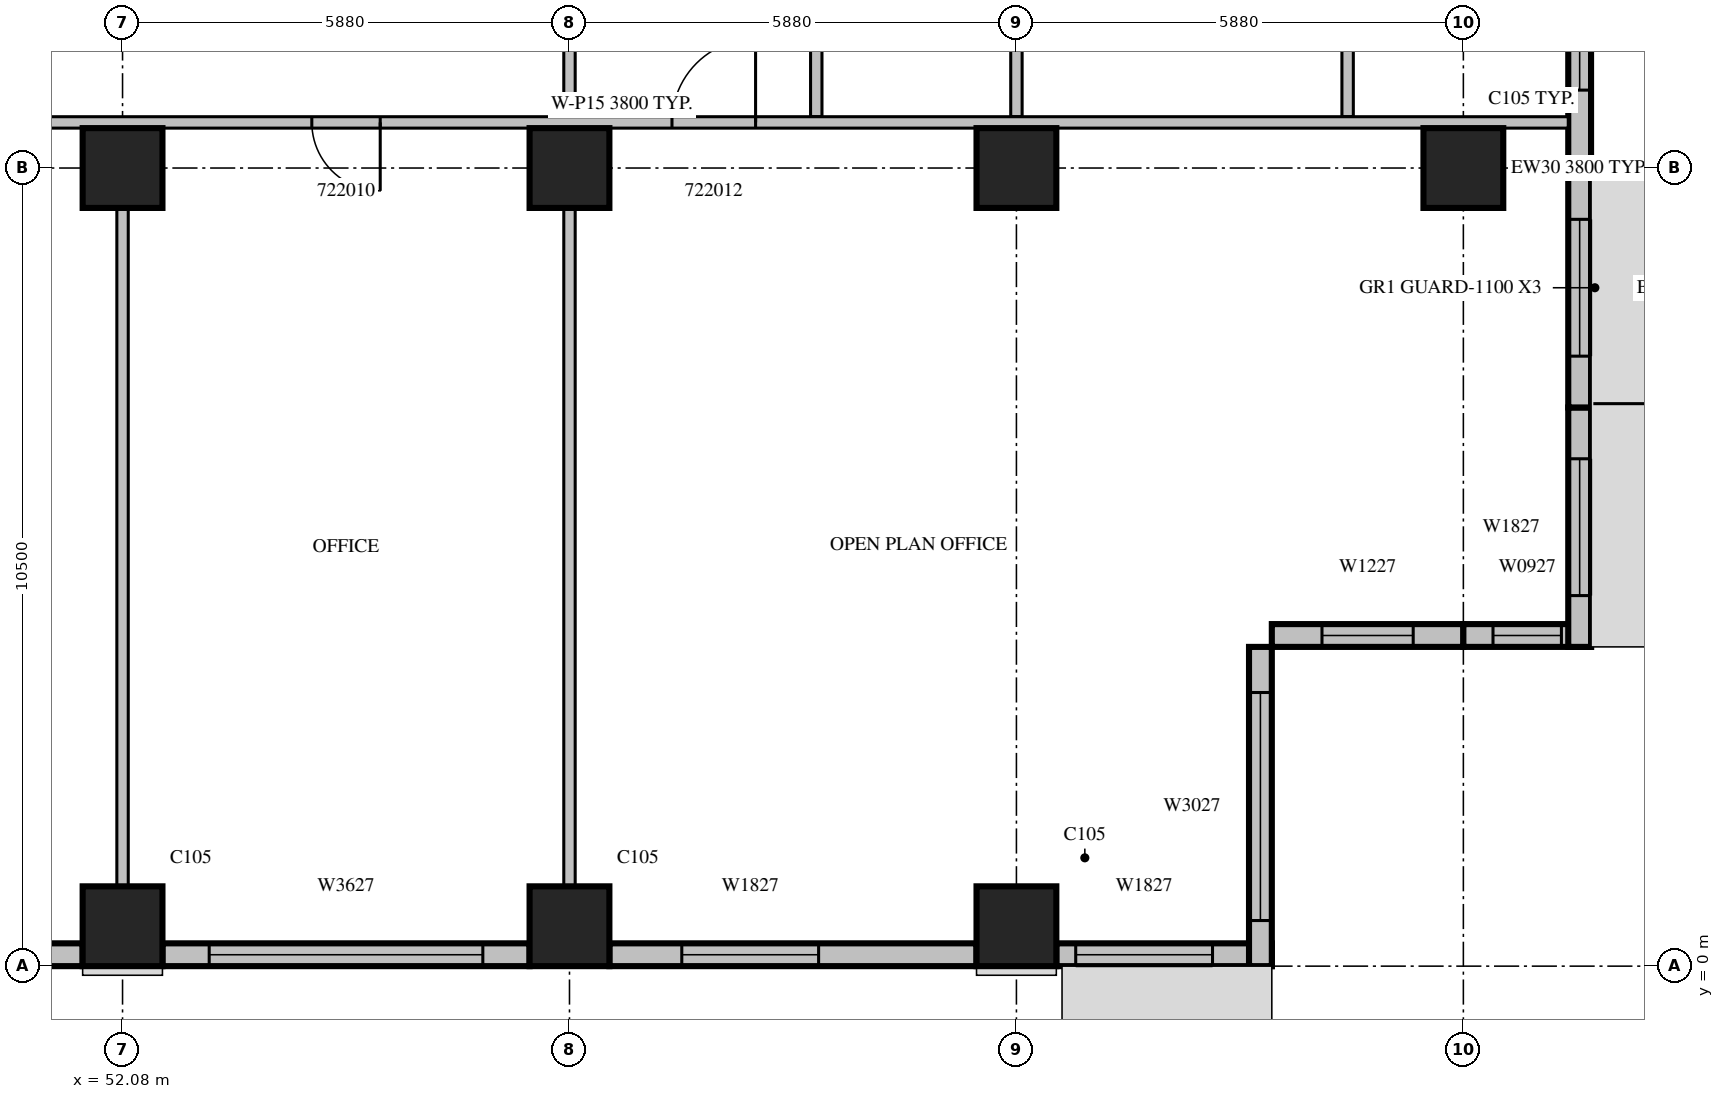
"""IFC4 building model, lengths in metres.
Left out: names, types, materials, properties, quantities, classifications, styles, units other than length and angle.
Written with IfcOpenShell. Run it as: python <this file> out.ifc"""

import sys

from ifc_helpers import new_model, si_unit, direction, frame, frame_2d, origin, origin_2d, place, context, subcontext, project, spatial, rectangle, extrude, source, transform, mapped, element, fill, save


model = new_model("IFC4")
c1 = context("Model", 3, precision=1e-05, world=origin(), true_north=direction((0.0, 1.0)))
c2 = subcontext(c1, "Body", "Model", "MODEL_VIEW")
j1 = project(units=[si_unit("LENGTHUNIT", "METRE"), si_unit("PLANEANGLEUNIT", "RADIAN")], contexts=[c1])
p1 = place(None, origin())
s1 = spatial("IfcSite", under=j1, at=p1, CompositionType="ELEMENT")
p2 = place(p1, origin())
s2 = spatial("IfcBuilding", under=s1, at=p2, CompositionType="ELEMENT")
p3 = place(p2, frame((0.0, 0.0, 103.5)))
s3 = spatial("IfcBuildingStorey", under=s2, at=p3, CompositionType="ELEMENT", Elevation=103.5)
m1 = source(origin(), c2, "Body", "SweptSolid", [
    extrude(rectangle(XDim=1.05, YDim=1.05, at=origin_2d()), origin(), (0.0, 0.0, 1.0), 4.2),
])
for number, where, z_axis, x_axis in (
    (1, (52.08, 0.525, 0.0), (0.0, 0.0, 1.0), (1.0, 0.0, 0.0)),
    (2, (57.96, 0.525, 0.0), (0.0, 0.0, 1.0), (1.0, 0.0, 0.0)),
    (3, (63.84, 0.525, 0.0), (0.0, 0.0, 1.0), (1.0, 0.0, 0.0)),
    (4, (52.08, 10.5, 0.0), (0.0, 0.0, 1.0), (1.0, 0.0, 0.0)),
    (5, (57.96, 10.5, 0.0), (0.0, 0.0, 1.0), (1.0, 0.0, 0.0)),
    (6, (63.84, 10.5, 0.0), (0.0, 0.0, 1.0), (1.0, 0.0, 0.0)),
    (7, (69.72, 10.5, 0.0), (0.0, 0.0, 1.0), (1.0, 0.0, 0.0)),
):
    element("IfcColumn", number, at=place(p3, frame(where, z_axis=z_axis, x_axis=x_axis)), inside=s3, PredefinedType="COLUMN", context=c2, shape_type="MappedRepresentation", body=[
        mapped(m1, transform((0.0, 0.0, 0.0), scale=1.0)),
    ])
p4 = place(p3, frame((46.725, 0.15, 0.0), z_axis=(0.0, 0.0, 1.0), x_axis=(1.0, 0.0, 0.0)))
e8 = element("IfcWall", 8, at=p4, inside=s3, PredefinedType="STANDARD", context=c2, shape_type="SweptSolid", body=[
    extrude(rectangle(XDim=4.83, YDim=0.3, at=frame_2d((2.415, 0.0))), origin(), (0.0, 0.0, 1.0), 3.3),
])
m2 = source(origin(), c2, "Body", "SweptSolid", [
    extrude(rectangle(XDim=3.6, YDim=2.7, at=frame_2d((1.8, 1.35))), frame((0.0, 0.16, 0.0), z_axis=(0.0, -1.0, 0.0), x_axis=(1.0, 0.0, 0.0)), (0.0, 0.0, 1.0), 0.32),
])
p5 = place(p4, frame((0.615, 0.0, 0.6)))
e9 = element("IfcOpeningElement", 9, at=p5, cuts=e8, PredefinedType="OPENING", context=c2, shape_type="MappedRepresentation", body=[
    mapped(m2, transform((0.0, 0.0, 0.0), scale=1.0)),
])
p6 = place(p3, frame((52.605, 0.15, 0.0), z_axis=(0.0, 0.0, 1.0), x_axis=(1.0, 0.0, 0.0)))
e10 = element("IfcWall", 10, at=p6, inside=s3, PredefinedType="STANDARD", context=c2, shape_type="SweptSolid", body=[
    extrude(rectangle(XDim=4.83, YDim=0.3, at=frame_2d((2.415, 0.0))), origin(), (0.0, 0.0, 1.0), 3.8),
])
p7 = place(p6, frame((0.615, 0.0, 0.6)))
e11 = element("IfcOpeningElement", 11, at=p7, cuts=e10, PredefinedType="OPENING", context=c2, shape_type="MappedRepresentation", body=[
    mapped(m2, transform((0.0, 0.0, 0.0), scale=1.0)),
])
m3 = source(origin(), c2, "Body", "SweptSolid", [
    extrude(rectangle(XDim=4.83, YDim=0.3, at=frame_2d((2.415, 0.0))), origin(), (0.0, 0.0, 1.0), 3.8),
])
p8 = place(p3, frame((58.485, 0.15, 0.0), z_axis=(0.0, 0.0, 1.0), x_axis=(1.0, 0.0, 0.0)))
e12 = element("IfcWall", 12, at=p8, inside=s3, PredefinedType="STANDARD", context=c2, shape_type="MappedRepresentation", body=[
    mapped(m3, transform((0.0, 0.0, 0.0), scale=1.0)),
])
m4 = source(origin(), c2, "Body", "SweptSolid", [
    extrude(rectangle(XDim=1.8, YDim=2.7, at=frame_2d((0.9, 1.35))), frame((0.0, 0.16, 0.0), z_axis=(0.0, -1.0, 0.0), x_axis=(1.0, 0.0, 0.0)), (0.0, 0.0, 1.0), 0.32),
])
p9 = place(p8, frame((0.953, 0.0, 0.6)))
e13 = element("IfcOpeningElement", 13, at=p9, cuts=e12, PredefinedType="OPENING", context=c2, shape_type="MappedRepresentation", body=[
    mapped(m4, transform((0.0, 0.0, 0.0), scale=1.0)),
])
p10 = place(p3, frame((64.365, 0.15, 0.0), z_axis=(0.0, 0.0, 1.0), x_axis=(1.0, 0.0, 0.0)))
e14 = element("IfcWall", 14, at=p10, inside=s3, PredefinedType="STANDARD", context=c2, shape_type="SweptSolid", body=[
    extrude(rectangle(XDim=2.835, YDim=0.3, at=frame_2d((1.417, 0.0))), origin(), (0.0, 0.0, 1.0), 3.8),
])
p11 = place(p10, frame((0.255, 0.0, 0.6)))
e15 = element("IfcOpeningElement", 15, at=p11, cuts=e14, PredefinedType="OPENING", context=c2, shape_type="MappedRepresentation", body=[
    mapped(m4, transform((0.0, 0.0, 0.0), scale=1.0)),
])
m5 = source(origin(), c2, "Body", "SweptSolid", [
    extrude(rectangle(XDim=4.2, YDim=0.3, at=frame_2d((2.1, 0.0))), origin(), (0.0, 0.0, 1.0), 3.8),
])
p12 = place(p3, frame((67.05, 0.0, 0.0), z_axis=(0.0, 0.0, 1.0), x_axis=(0.0, 1.0, 0.0)))
e16 = element("IfcWall", 16, at=p12, inside=s3, PredefinedType="STANDARD", context=c2, shape_type="MappedRepresentation", body=[
    mapped(m5, transform((0.0, 0.0, 0.0), scale=1.0)),
])
m6 = source(origin(), c2, "Body", "SweptSolid", [
    extrude(rectangle(XDim=3.0, YDim=2.7, at=frame_2d((1.5, 1.35))), frame((0.0, 0.16, 0.0), z_axis=(0.0, -1.0, 0.0), x_axis=(1.0, 0.0, 0.0)), (0.0, 0.0, 1.0), 0.32),
])
p13 = place(p12, frame((0.6, 0.0, 0.6)))
e17 = element("IfcOpeningElement", 17, at=p13, cuts=e16, PredefinedType="OPENING", context=c2, shape_type="MappedRepresentation", body=[
    mapped(m6, transform((0.0, 0.0, 0.0), scale=1.0)),
])
m7 = source(origin(), c2, "Body", "SweptSolid", [
    extrude(rectangle(XDim=2.52, YDim=0.3, at=frame_2d((1.26, 0.0))), origin(), (0.0, 0.0, 1.0), 3.8),
])
p14 = place(p3, frame((67.2, 4.35, 0.0), z_axis=(0.0, 0.0, 1.0), x_axis=(1.0, 0.0, 0.0)))
e18 = element("IfcWall", 18, at=p14, inside=s3, PredefinedType="STANDARD", context=c2, shape_type="MappedRepresentation", body=[
    mapped(m7, transform((0.0, 0.0, 0.0), scale=1.0)),
])
m8 = source(origin(), c2, "Body", "SweptSolid", [
    extrude(rectangle(XDim=1.2, YDim=2.7, at=frame_2d((0.6, 1.35))), frame((0.0, 0.16, 0.0), z_axis=(0.0, -1.0, 0.0), x_axis=(1.0, 0.0, 0.0)), (0.0, 0.0, 1.0), 0.32),
])
p15 = place(p14, frame((0.66, 0.0, 0.6)))
e19 = element("IfcOpeningElement", 19, at=p15, cuts=e18, PredefinedType="OPENING", context=c2, shape_type="MappedRepresentation", body=[
    mapped(m8, transform((0.0, 0.0, 0.0), scale=1.0)),
])
m9 = source(origin(), c2, "Body", "SweptSolid", [
    extrude(rectangle(XDim=1.68, YDim=0.3, at=frame_2d((0.84, 0.0))), origin(), (0.0, 0.0, 1.0), 3.8),
])
p16 = place(p3, frame((69.72, 4.35, 0.0), z_axis=(0.0, 0.0, 1.0), x_axis=(1.0, 0.0, 0.0)))
e20 = element("IfcWall", 20, at=p16, inside=s3, PredefinedType="STANDARD", context=c2, shape_type="MappedRepresentation", body=[
    mapped(m9, transform((0.0, 0.0, 0.0), scale=1.0)),
])
m10 = source(origin(), c2, "Body", "SweptSolid", [
    extrude(rectangle(XDim=0.9, YDim=2.7, at=frame_2d((0.45, 1.35))), frame((0.0, 0.16, 0.0), z_axis=(0.0, -1.0, 0.0), x_axis=(1.0, 0.0, 0.0)), (0.0, 0.0, 1.0), 0.32),
])
p17 = place(p16, frame((0.39, 0.0, 0.6)))
e21 = element("IfcOpeningElement", 21, at=p17, cuts=e20, PredefinedType="OPENING", context=c2, shape_type="MappedRepresentation", body=[
    mapped(m10, transform((0.0, 0.0, 0.0), scale=1.0)),
])
m11 = source(origin(), c2, "Body", "SweptSolid", [
    extrude(rectangle(XDim=3.15, YDim=0.3, at=frame_2d((1.575, 0.0))), origin(), (0.0, 0.0, 1.0), 3.8),
])
p18 = place(p3, frame((71.25, 4.2, 0.0), z_axis=(0.0, 0.0, 1.0), x_axis=(0.0, 1.0, 0.0)))
e22 = element("IfcWall", 22, at=p18, inside=s3, PredefinedType="STANDARD", context=c2, shape_type="MappedRepresentation", body=[
    mapped(m11, transform((0.0, 0.0, 0.0), scale=1.0)),
])
p19 = place(p18, frame((0.675, 0.0, 0.6)))
e23 = element("IfcOpeningElement", 23, at=p19, cuts=e22, PredefinedType="OPENING", context=c2, shape_type="MappedRepresentation", body=[
    mapped(m4, transform((0.0, 0.0, 0.0), scale=1.0)),
])
p20 = place(p3, frame((71.25, 7.35, 0.0), z_axis=(0.0, 0.0, 1.0), x_axis=(0.0, 1.0, 0.0)))
e24 = element("IfcWall", 24, at=p20, inside=s3, PredefinedType="STANDARD", context=c2, shape_type="MappedRepresentation", body=[
    mapped(m11, transform((0.0, 0.0, 0.0), scale=1.0)),
])
m12 = source(origin(), c2, "Body", "SweptSolid", [
    extrude(rectangle(XDim=1.8, YDim=2.4, at=frame_2d((0.9, 1.2))), frame((0.0, 0.16, 0.0), z_axis=(0.0, -1.0, 0.0), x_axis=(1.0, 0.0, 0.0)), (0.0, 0.0, 1.0), 0.32),
])
p21 = place(p20, frame((0.675, 0.0, 0.0)))
e25 = element("IfcOpeningElement", 25, at=p21, cuts=e24, PredefinedType="OPENING", context=c2, shape_type="MappedRepresentation", body=[
    mapped(m12, transform((0.0, 0.0, 0.0), scale=1.0)),
])
m13 = source(origin(), c2, "Body", "SweptSolid", [
    extrude(rectangle(XDim=6.3, YDim=0.3, at=frame_2d((3.15, 0.0))), origin(), (0.0, 0.0, 1.0), 3.8),
])
p22 = place(p3, frame((71.25, 10.5, 0.0), z_axis=(0.0, 0.0, 1.0), x_axis=(0.0, 1.0, 0.0)))
e26 = element("IfcWall", 26, at=p22, inside=s3, PredefinedType="STANDARD", context=c2, shape_type="MappedRepresentation", body=[
    mapped(m13, transform((0.0, 0.0, 0.0), scale=1.0)),
])
p23 = place(p22, frame((1.025, 0.0, 0.6)))
e27 = element("IfcOpeningElement", 27, at=p23, cuts=e26, PredefinedType="OPENING", context=c2, shape_type="MappedRepresentation", body=[
    mapped(m8, transform((0.0, 0.0, 0.0), scale=1.0)),
])
p24 = place(p3, frame((52.08, 1.049, 0.0), z_axis=(0.0, 0.0, 1.0), x_axis=(0.0, 1.0, 0.0)))
e28 = element("IfcWall", 28, at=p24, inside=s3, PredefinedType="PARTITIONING", context=c2, shape_type="SweptSolid", body=[
    extrude(rectangle(XDim=8.927, YDim=0.15, at=frame_2d((4.463, 0.0))), origin(), (0.0, 0.0, 1.0), 3.8),
])
p25 = place(p3, frame((61.207, 11.175, 0.0), z_axis=(0.0, 0.0, 1.0), x_axis=(0.0, 1.0, 0.0)))
e29 = element("IfcWall", 29, at=p25, inside=s3, PredefinedType="PARTITIONING", context=c2, shape_type="SweptSolid", body=[
    extrude(rectangle(XDim=3.825, YDim=0.15, at=frame_2d((1.913, 0.0))), origin(), (0.0, 0.0, 1.0), 3.8),
])
m14 = source(origin(), c2, "Body", "SweptSolid", [
    extrude(rectangle(XDim=3.825, YDim=0.15, at=frame_2d((1.913, 0.0))), origin(), (0.0, 0.0, 1.0), 3.8),
])
for number, where, z_axis, x_axis in (
    (30, (63.84, 11.175, 0.0), (0.0, 0.0, 1.0), (0.0, 1.0, 0.0)),
    (31, (68.197, 11.175, 0.0), (0.0, 0.0, 1.0), (0.0, 1.0, 0.0)),
):
    element("IfcWall", number, at=place(p3, frame(where, z_axis=z_axis, x_axis=x_axis)), inside=s3, PredefinedType="PARTITIONING", context=c2, shape_type="MappedRepresentation", body=[
        mapped(m14, transform((0.0, 0.0, 0.0), scale=1.0)),
    ])
m15 = source(origin(), c2, "Body", "SweptSolid", [
    extrude(rectangle(XDim=8.927, YDim=0.15, at=frame_2d((4.463, 0.0))), origin(), (0.0, 0.0, 1.0), 3.8),
])
p26 = place(p3, frame((57.96, 1.049, 0.0), z_axis=(0.0, 0.0, 1.0), x_axis=(0.0, 1.0, 0.0)))
e32 = element("IfcWall", 32, at=p26, inside=s3, PredefinedType="PARTITIONING", context=c2, shape_type="MappedRepresentation", body=[
    mapped(m15, transform((0.0, 0.0, 0.0), scale=1.0)),
])
p27 = place(p3, frame((57.96, 11.175, 0.0), z_axis=(0.0, 0.0, 1.0), x_axis=(0.0, 1.0, 0.0)))
e33 = element("IfcWall", 33, at=p27, inside=s3, PredefinedType="PARTITIONING", context=c2, shape_type="MappedRepresentation", body=[
    mapped(m14, transform((0.0, 0.0, 0.0), scale=1.0)),
])
m16 = source(origin(), c2, "Body", "SweptSolid", [
    extrude(rectangle(XDim=24.9, YDim=0.15, at=frame_2d((12.45, 0.0))), origin(), (0.0, 0.0, 1.0), 3.8),
])
p28 = place(p3, frame((71.1, 11.1, 0.0), z_axis=(0.0, 0.0, 1.0), x_axis=(-1.0, 0.0, 0.0)))
e34 = element("IfcWall", 34, at=p28, inside=s3, PredefinedType="PARTITIONING", context=c2, shape_type="MappedRepresentation", body=[
    mapped(m16, transform((0.0, 0.0, 0.0), scale=1.0)),
])
m17 = source(origin(), c2, "Body", "SweptSolid", [
    extrude(rectangle(XDim=0.9, YDim=2.1, at=frame_2d((0.45, 1.05))), frame((0.0, 0.085, 0.0), z_axis=(0.0, -1.0, 0.0), x_axis=(1.0, 0.0, 0.0)), (0.0, 0.0, 1.0), 0.17),
])
p29 = place(p28, frame((21.51, 0.0, 0.0)))
e35 = element("IfcOpeningElement", 35, at=p29, cuts=e34, PredefinedType="OPENING", context=c2, shape_type="MappedRepresentation", body=[
    mapped(m17, transform((0.0, 0.0, 0.0), scale=1.0)),
])
p30 = place(p28, frame((15.63, 0.0, 0.0)))
e36 = element("IfcOpeningElement", 36, at=p30, cuts=e34, PredefinedType="OPENING", context=c2, shape_type="MappedRepresentation", body=[
    mapped(m17, transform((0.0, 0.0, 0.0), scale=1.0)),
])
m18 = source(origin(), c2, "Body", "SweptSolid", [
    extrude(rectangle(XDim=1.1, YDim=2.1, at=frame_2d((0.55, 1.05))), frame((0.0, 0.085, 0.0), z_axis=(0.0, -1.0, 0.0), x_axis=(1.0, 0.0, 0.0)), (0.0, 0.0, 1.0), 0.17),
])
p31 = place(p28, frame((10.692, 0.0, 0.0)))
e37 = element("IfcOpeningElement", 37, at=p31, cuts=e34, PredefinedType="OPENING", context=c2, shape_type="MappedRepresentation", body=[
    mapped(m18, transform((0.0, 0.0, 0.0), scale=1.0)),
])
m19 = source(origin(), c2, "Body", "SweptSolid", [
    extrude(rectangle(XDim=3.6, YDim=2.7, at=frame_2d((1.8, 1.35))), frame((0.0, 0.03, 0.0), z_axis=(0.0, -1.0, 0.0), x_axis=(1.0, 0.0, 0.0)), (0.0, 0.0, 1.0), 0.06),
])
p32 = place(p7, origin())
e38 = element("IfcWindow", 38, at=p32, inside=s3, PartitioningType="SINGLE_PANEL", PredefinedType="WINDOW", context=c2, shape_type="MappedRepresentation", body=[
    mapped(m19, transform((0.0, 0.0, 0.0), scale=1.0)),
])
fill(e11, e38)
m20 = source(origin(), c2, "Body", "SweptSolid", [
    extrude(rectangle(XDim=1.8, YDim=2.7, at=frame_2d((0.9, 1.35))), frame((0.0, 0.03, 0.0), z_axis=(0.0, -1.0, 0.0), x_axis=(1.0, 0.0, 0.0)), (0.0, 0.0, 1.0), 0.06),
])
p33 = place(p9, origin())
e39 = element("IfcWindow", 39, at=p33, inside=s3, PartitioningType="SINGLE_PANEL", PredefinedType="WINDOW", context=c2, shape_type="MappedRepresentation", body=[
    mapped(m20, transform((0.0, 0.0, 0.0), scale=1.0)),
])
fill(e13, e39)
p34 = place(p11, origin())
e40 = element("IfcWindow", 40, at=p34, inside=s3, PartitioningType="SINGLE_PANEL", PredefinedType="WINDOW", context=c2, shape_type="MappedRepresentation", body=[
    mapped(m20, transform((0.0, 0.0, 0.0), scale=1.0)),
])
fill(e15, e40)
m21 = source(origin(), c2, "Body", "SweptSolid", [
    extrude(rectangle(XDim=3.0, YDim=2.7, at=frame_2d((1.5, 1.35))), frame((0.0, 0.03, 0.0), z_axis=(0.0, -1.0, 0.0), x_axis=(1.0, 0.0, 0.0)), (0.0, 0.0, 1.0), 0.06),
])
p35 = place(p13, origin())
e41 = element("IfcWindow", 41, at=p35, inside=s3, PartitioningType="SINGLE_PANEL", PredefinedType="WINDOW", context=c2, shape_type="MappedRepresentation", body=[
    mapped(m21, transform((0.0, 0.0, 0.0), scale=1.0)),
])
fill(e17, e41)
m22 = source(origin(), c2, "Body", "SweptSolid", [
    extrude(rectangle(XDim=1.2, YDim=2.7, at=frame_2d((0.6, 1.35))), frame((0.0, 0.03, 0.0), z_axis=(0.0, -1.0, 0.0), x_axis=(1.0, 0.0, 0.0)), (0.0, 0.0, 1.0), 0.06),
])
p36 = place(p15, origin())
e42 = element("IfcWindow", 42, at=p36, inside=s3, PartitioningType="SINGLE_PANEL", PredefinedType="WINDOW", context=c2, shape_type="MappedRepresentation", body=[
    mapped(m22, transform((0.0, 0.0, 0.0), scale=1.0)),
])
fill(e19, e42)
m23 = source(origin(), c2, "Body", "SweptSolid", [
    extrude(rectangle(XDim=0.9, YDim=2.7, at=frame_2d((0.45, 1.35))), frame((0.0, 0.03, 0.0), z_axis=(0.0, -1.0, 0.0), x_axis=(1.0, 0.0, 0.0)), (0.0, 0.0, 1.0), 0.06),
])
p37 = place(p17, origin())
e43 = element("IfcWindow", 43, at=p37, inside=s3, PartitioningType="SINGLE_PANEL", PredefinedType="WINDOW", context=c2, shape_type="MappedRepresentation", body=[
    mapped(m23, transform((0.0, 0.0, 0.0), scale=1.0)),
])
fill(e21, e43)
p38 = place(p19, origin())
e44 = element("IfcWindow", 44, at=p38, inside=s3, PartitioningType="SINGLE_PANEL", PredefinedType="WINDOW", context=c2, shape_type="MappedRepresentation", body=[
    mapped(m20, transform((0.0, 0.0, 0.0), scale=1.0)),
])
fill(e23, e44)
m24 = source(origin(), c2, "Body", "SweptSolid", [
    extrude(rectangle(XDim=1.8, YDim=2.4, at=frame_2d((0.9, 1.2))), frame((0.0, 0.025, 0.0), z_axis=(0.0, -1.0, 0.0), x_axis=(1.0, 0.0, 0.0)), (0.0, 0.0, 1.0), 0.05),
])
p39 = place(p21, origin())
e45 = element("IfcDoor", 45, at=p39, inside=s3, OperationType="SLIDING_TO_LEFT", PredefinedType="DOOR", context=c2, shape_type="MappedRepresentation", body=[
    mapped(m24, transform((0.0, 0.0, 0.0), scale=1.0)),
])
fill(e25, e45)
p40 = place(p23, origin())
e46 = element("IfcWindow", 46, at=p40, inside=s3, PartitioningType="SINGLE_PANEL", PredefinedType="WINDOW", context=c2, shape_type="MappedRepresentation", body=[
    mapped(m22, transform((0.0, 0.0, 0.0), scale=1.0)),
])
fill(e27, e46)
m25 = source(origin(), c2, "Body", "SweptSolid", [
    extrude(rectangle(XDim=0.9, YDim=2.1, at=frame_2d((0.45, 1.05))), frame((0.0, 0.025, 0.0), z_axis=(0.0, -1.0, 0.0), x_axis=(1.0, 0.0, 0.0)), (0.0, 0.0, 1.0), 0.05),
])
p41 = place(p30, origin())
e47 = element("IfcDoor", 47, at=p41, inside=s3, OperationType="SINGLE_SWING_LEFT", PredefinedType="DOOR", context=c2, shape_type="MappedRepresentation", body=[
    mapped(m25, transform((0.0, 0.0, 0.0), scale=1.0)),
])
fill(e36, e47)
m26 = source(origin(), c2, "Body", "SweptSolid", [
    extrude(rectangle(XDim=1.1, YDim=2.1, at=frame_2d((0.55, 1.05))), frame((0.0, 0.025, 0.0), z_axis=(0.0, -1.0, 0.0), x_axis=(1.0, 0.0, 0.0)), (0.0, 0.0, 1.0), 0.05),
])
p42 = place(p31, origin())
e48 = element("IfcDoor", 48, at=p42, inside=s3, OperationType="SINGLE_SWING_RIGHT", PredefinedType="DOOR", context=c2, shape_type="MappedRepresentation", body=[
    mapped(m26, transform((0.0, 0.0, 0.0), scale=1.0)),
])
fill(e37, e48)
save(model, sys.argv[1])
